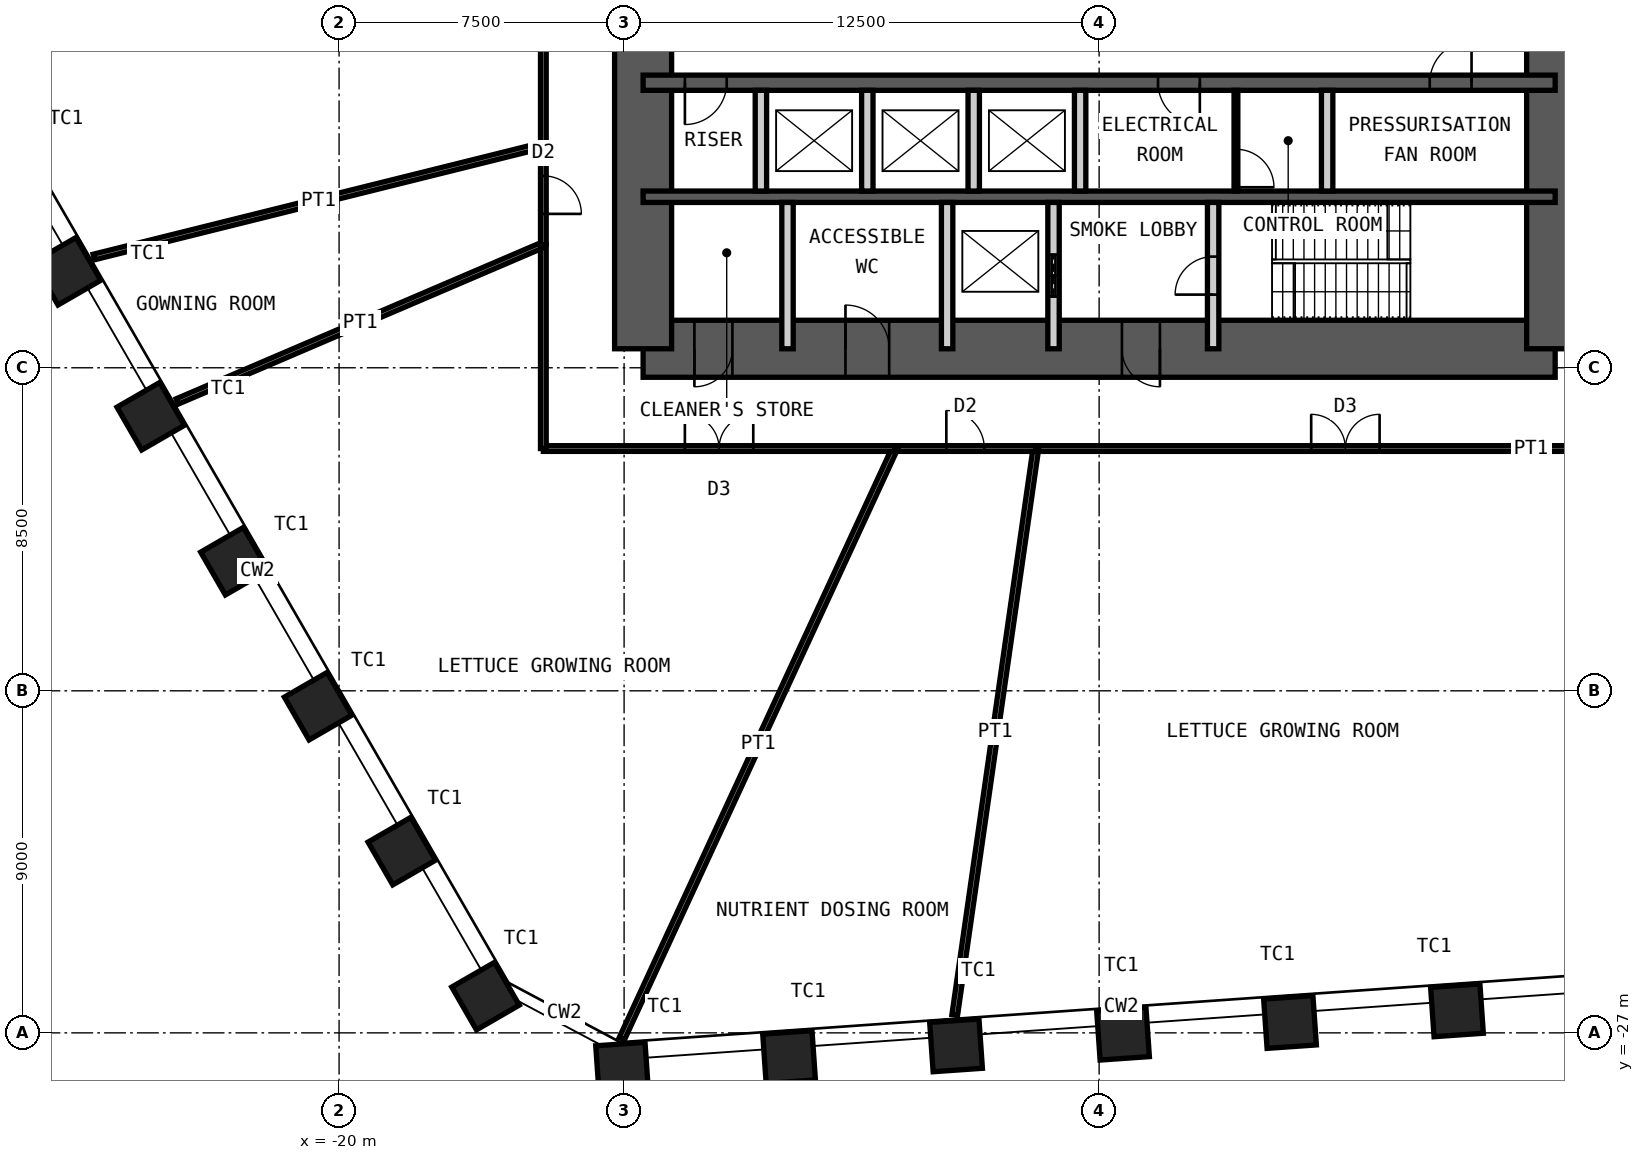
"""IFC4 building model, lengths in metres.
Left out: names, types, materials, properties, quantities, classifications, styles, units other than length and angle.
Written with IfcOpenShell. Run it as: python <this file> out.ifc"""

import sys

from ifc_helpers import new_model, si_unit, direction, frame, frame_2d, origin, origin_2d, place, context, subcontext, project, spatial, rectangle, hollow_rectangle, extrude, element, fill, save


model = new_model("IFC4")
c1 = context("Model", 3, precision=1e-05, world=origin(), true_north=direction((0.0, 1.0)))
c2 = subcontext(c1, "Body", "Model", "MODEL_VIEW")
j1 = project(units=[si_unit("LENGTHUNIT", "METRE"), si_unit("PLANEANGLEUNIT", "RADIAN")], contexts=[c1])
p1 = place(None, origin())
s1 = spatial("IfcSite", under=j1, at=p1, CompositionType="ELEMENT")
p2 = place(p1, origin())
s2 = spatial("IfcBuilding", under=s1, at=p2, CompositionType="ELEMENT")
p3 = place(p2, frame((0.0, 0.0, 47.0)))
s3 = spatial("IfcBuildingStorey", under=s2, at=p3, CompositionType="ELEMENT", Elevation=47.0)
for number, where, z_axis, x_axis in (
    (1, (9.417, -26.407, 0.0), (0.0, 0.0, 1.0), (0.998, 0.07, 0.0)),
    (2, (5.023, -26.715, 0.0), (0.0, 0.0, 1.0), (0.998, 0.07, 0.0)),
    (3, (0.629, -27.022, 0.0), (0.0, 0.0, 1.0), (0.998, 0.07, 0.0)),
    (4, (-3.765, -27.329, 0.0), (0.0, 0.0, 1.0), (0.998, 0.07, 0.0)),
    (5, (-8.159, -27.636, 0.0), (0.0, 0.0, 1.0), (0.998, 0.07, 0.0)),
    (6, (-12.553, -27.944, 0.0), (0.0, 0.0, 1.0), (0.998, 0.07, 0.0)),
    (7, (-16.147, -26.033, 0.0), (0.0, 0.0, 1.0), (0.5, -0.866, 0.0)),
    (8, (-18.349, -22.218, 0.0), (0.0, 0.0, 1.0), (0.5, -0.866, 0.0)),
    (9, (-20.552, -18.404, 0.0), (0.0, 0.0, 1.0), (0.5, -0.866, 0.0)),
    (10, (-22.754, -14.589, 0.0), (0.0, 0.0, 1.0), (0.5, -0.866, 0.0)),
    (11, (-24.956, -10.775, 0.0), (0.0, 0.0, 1.0), (0.5, -0.866, 0.0)),
    (12, (-27.158, -6.96, 0.0), (0.0, 0.0, 1.0), (0.5, -0.866, 0.0)),
):
    element("IfcColumn", number, at=place(p3, frame(where, z_axis=z_axis, x_axis=x_axis)), inside=s3, PredefinedType="COLUMN", context=c2, shape_type="SweptSolid", body=[
        extrude(hollow_rectangle(XDim=1.3, YDim=1.3, WallThickness=0.1, at=origin_2d()), origin(), (0.0, 0.0, 1.0), 5.0),
    ])
p4 = place(p3, frame((-12.0, -9.0, 0.0), z_axis=(0.0, 0.0, 1.0), x_axis=(1.0, 0.0, 0.0)))
e13 = element("IfcWall", 13, at=p4, inside=s3, PredefinedType="SHEAR", context=c2, shape_type="SweptSolid", body=[
    extrude(rectangle(XDim=24.0, YDim=1.5, at=frame_2d((12.0, 0.0))), origin(), (0.0, 0.0, 1.0), 5.0),
])
p5 = place(p4, frame((1.35, 0.0, 0.0)))
e14 = element("IfcOpeningElement", 14, at=p5, cuts=e13, PredefinedType="OPENING", context=c2, shape_type="SweptSolid", body=[
    extrude(rectangle(XDim=1.0, YDim=2.1, at=frame_2d((0.5, 1.05))), frame((0.0, 0.76, 0.0), z_axis=(0.0, -1.0, 0.0), x_axis=(1.0, 0.0, 0.0)), (0.0, 0.0, 1.0), 1.52),
])
p6 = place(p4, frame((5.325, 0.0, 0.0)))
e15 = element("IfcOpeningElement", 15, at=p6, cuts=e13, PredefinedType="OPENING", context=c2, shape_type="SweptSolid", body=[
    extrude(rectangle(XDim=1.15, YDim=2.1, at=frame_2d((0.575, 1.05))), frame((0.0, 0.76, 0.0), z_axis=(0.0, -1.0, 0.0), x_axis=(1.0, 0.0, 0.0)), (0.0, 0.0, 1.0), 1.52),
])
p7 = place(p4, frame((12.6, 0.0, 0.0)))
e16 = element("IfcOpeningElement", 16, at=p7, cuts=e13, PredefinedType="OPENING", context=c2, shape_type="SweptSolid", body=[
    extrude(rectangle(XDim=1.0, YDim=2.1, at=frame_2d((0.5, 1.05))), frame((0.0, 0.76, 0.0), z_axis=(0.0, -1.0, 0.0), x_axis=(1.0, 0.0, 0.0)), (0.0, 0.0, 1.0), 1.52),
])
p8 = place(p3, frame((12.0, -9.0, 0.0), z_axis=(0.0, 0.0, 1.0), x_axis=(0.0, 1.0, 0.0)))
e17 = element("IfcWall", 17, at=p8, inside=s3, PredefinedType="SHEAR", context=c2, shape_type="SweptSolid", body=[
    extrude(rectangle(XDim=18.0, YDim=1.5, at=frame_2d((9.0, 0.0))), origin(), (0.0, 0.0, 1.0), 5.0),
])
p9 = place(p8, frame((8.1, 0.0, 0.0)))
e18 = element("IfcOpeningElement", 18, at=p9, cuts=e17, PredefinedType="OPENING", context=c2, shape_type="SweptSolid", body=[
    extrude(rectangle(XDim=1.8, YDim=2.1, at=frame_2d((0.9, 1.05))), frame((0.0, 0.76, 0.0), z_axis=(0.0, -1.0, 0.0), x_axis=(1.0, 0.0, 0.0)), (0.0, 0.0, 1.0), 1.52),
])
p10 = place(p3, frame((-12.0, -9.0, 0.0), z_axis=(0.0, 0.0, 1.0), x_axis=(0.0, 1.0, 0.0)))
e19 = element("IfcWall", 19, at=p10, inside=s3, PredefinedType="SHEAR", context=c2, shape_type="SweptSolid", body=[
    extrude(rectangle(XDim=18.0, YDim=1.5, at=frame_2d((9.0, 0.0))), origin(), (0.0, 0.0, 1.0), 5.0),
])
p11 = place(p10, frame((8.1, 0.0, 0.0)))
e20 = element("IfcOpeningElement", 20, at=p11, cuts=e19, PredefinedType="OPENING", context=c2, shape_type="SweptSolid", body=[
    extrude(rectangle(XDim=1.8, YDim=2.1, at=frame_2d((0.9, 1.05))), frame((0.0, 0.76, 0.0), z_axis=(0.0, -1.0, 0.0), x_axis=(1.0, 0.0, 0.0)), (0.0, 0.0, 1.0), 1.52),
])
p12 = place(p3, frame((-12.0, -2.0, 0.0), z_axis=(0.0, 0.0, 1.0), x_axis=(1.0, 0.0, 0.0)))
e21 = element("IfcWall", 21, at=p12, inside=s3, PredefinedType="SHEAR", context=c2, shape_type="SweptSolid", body=[
    extrude(rectangle(XDim=24.0, YDim=0.4, at=frame_2d((12.0, 0.0))), origin(), (0.0, 0.0, 1.0), 5.0),
])
p13 = place(p12, frame((1.1, 0.0, 0.0)))
e22 = element("IfcOpeningElement", 22, at=p13, cuts=e21, PredefinedType="OPENING", context=c2, shape_type="SweptSolid", body=[
    extrude(rectangle(XDim=1.1, YDim=2.1, at=frame_2d((0.55, 1.05))), frame((0.0, 0.21, 0.0), z_axis=(0.0, -1.0, 0.0), x_axis=(1.0, 0.0, 0.0)), (0.0, 0.0, 1.0), 0.42),
])
p14 = place(p12, frame((13.55, 0.0, 0.0)))
e23 = element("IfcOpeningElement", 23, at=p14, cuts=e21, PredefinedType="OPENING", context=c2, shape_type="SweptSolid", body=[
    extrude(rectangle(XDim=1.1, YDim=2.1, at=frame_2d((0.55, 1.05))), frame((0.0, 0.21, 0.0), z_axis=(0.0, -1.0, 0.0), x_axis=(1.0, 0.0, 0.0)), (0.0, 0.0, 1.0), 0.42),
])
p15 = place(p12, frame((20.7, 0.0, 0.0)))
e24 = element("IfcOpeningElement", 24, at=p15, cuts=e21, PredefinedType="OPENING", context=c2, shape_type="SweptSolid", body=[
    extrude(rectangle(XDim=1.1, YDim=2.1, at=frame_2d((0.55, 1.05))), frame((0.0, 0.21, 0.0), z_axis=(0.0, -1.0, 0.0), x_axis=(1.0, 0.0, 0.0)), (0.0, 0.0, 1.0), 0.42),
])
p16 = place(p3, frame((-12.0, -5.0, 0.0), z_axis=(0.0, 0.0, 1.0), x_axis=(1.0, 0.0, 0.0)))
e25 = element("IfcWall", 25, at=p16, inside=s3, PredefinedType="SHEAR", context=c2, shape_type="SweptSolid", body=[
    extrude(rectangle(XDim=24.0, YDim=0.3, at=frame_2d((12.0, 0.0))), origin(), (0.0, 0.0, 1.0), 5.0),
])
for number, where, z_axis, x_axis in (
    (26, (-8.9, -4.85, 0.0), (0.0, 0.0, 1.0), (0.0, 1.0, 0.0)),
    (27, (-6.1, -4.85, 0.0), (0.0, 0.0, 1.0), (0.0, 1.0, 0.0)),
    (28, (-3.3, -4.85, 0.0), (0.0, 0.0, 1.0), (0.0, 1.0, 0.0)),
    (29, (-0.5, -4.85, 0.0), (0.0, 0.0, 1.0), (0.0, 1.0, 0.0)),
    (30, (6.0, -4.85, 0.0), (0.0, 0.0, 1.0), (0.0, 1.0, 0.0)),
):
    element("IfcWall", number, at=place(p3, frame(where, z_axis=z_axis, x_axis=x_axis)), inside=s3, PredefinedType="PARTITIONING", context=c2, shape_type="SweptSolid", body=[
        extrude(rectangle(XDim=2.65, YDim=0.3, at=frame_2d((1.325, 0.0))), origin(), (0.0, 0.0, 1.0), 4.78),
    ])
for number, where, z_axis, x_axis in (
    (31, (-8.2, -9.0, 0.0), (0.0, 0.0, 1.0), (0.0, 1.0, 0.0)),
    (32, (-4.0, -9.0, 0.0), (0.0, 0.0, 1.0), (0.0, 1.0, 0.0)),
):
    element("IfcWall", number, at=place(p3, frame(where, z_axis=z_axis, x_axis=x_axis)), inside=s3, PredefinedType="PARTITIONING", context=c2, shape_type="SweptSolid", body=[
        extrude(rectangle(XDim=3.85, YDim=0.3, at=frame_2d((1.925, 0.0))), origin(), (0.0, 0.0, 1.0), 4.78),
    ])
p17 = place(p3, frame((-1.2, -9.0, 0.0), z_axis=(0.0, 0.0, 1.0), x_axis=(0.0, 1.0, 0.0)))
e33 = element("IfcWall", 33, at=p17, inside=s3, PredefinedType="PARTITIONING", context=c2, shape_type="SweptSolid", body=[
    extrude(rectangle(XDim=3.85, YDim=0.3, at=frame_2d((1.925, 0.0))), origin(), (0.0, 0.0, 1.0), 4.78),
])
p18 = place(p17, frame((1.375, 0.0, 0.0)))
e34 = element("IfcOpeningElement", 34, at=p18, cuts=e33, PredefinedType="OPENING", context=c2, shape_type="SweptSolid", body=[
    extrude(rectangle(XDim=1.1, YDim=2.4, at=frame_2d((0.55, 1.2))), frame((0.0, 0.16, 0.0), z_axis=(0.0, -1.0, 0.0), x_axis=(1.0, 0.0, 0.0)), (0.0, 0.0, 1.0), 0.32),
])
p19 = place(p3, frame((3.0, -9.0, 0.0), z_axis=(0.0, 0.0, 1.0), x_axis=(0.0, 1.0, 0.0)))
e35 = element("IfcWall", 35, at=p19, inside=s3, PredefinedType="PARTITIONING", context=c2, shape_type="SweptSolid", body=[
    extrude(rectangle(XDim=3.85, YDim=0.3, at=frame_2d((1.925, 0.0))), origin(), (0.0, 0.0, 1.0), 4.78),
])
p20 = place(p19, frame((1.425, 0.0, 0.0)))
e36 = element("IfcOpeningElement", 36, at=p20, cuts=e35, PredefinedType="OPENING", context=c2, shape_type="SweptSolid", body=[
    extrude(rectangle(XDim=1.0, YDim=2.1, at=frame_2d((0.5, 1.05))), frame((0.0, 0.16, 0.0), z_axis=(0.0, -1.0, 0.0), x_axis=(1.0, 0.0, 0.0)), (0.0, 0.0, 1.0), 0.32),
])
p21 = place(p3, frame((3.6, -4.85, 0.0), z_axis=(0.0, 0.0, 1.0), x_axis=(0.0, 1.0, 0.0)))
e37 = element("IfcWall", 37, at=p21, inside=s3, PredefinedType="PARTITIONING", context=c2, shape_type="SweptSolid", body=[
    extrude(rectangle(XDim=2.65, YDim=0.1, at=frame_2d((1.325, 0.0))), origin(), (0.0, 0.0, 1.0), 4.78),
])
p22 = place(p21, frame((0.1, 0.0, 0.0)))
e38 = element("IfcOpeningElement", 38, at=p22, cuts=e37, PredefinedType="OPENING", context=c2, shape_type="SweptSolid", body=[
    extrude(rectangle(XDim=1.0, YDim=2.4, at=frame_2d((0.5, 1.2))), frame((0.0, 0.06, 0.0), z_axis=(0.0, -1.0, 0.0), x_axis=(1.0, 0.0, 0.0)), (0.0, 0.0, 1.0), 0.12),
])
p23 = place(p3, frame((14.625, -11.625, 0.0), z_axis=(0.0, 0.0, 1.0), x_axis=(-1.0, 0.0, 0.0)))
e39 = element("IfcWall", 39, at=p23, inside=s3, PredefinedType="PARTITIONING", context=c2, shape_type="SweptSolid", body=[
    extrude(rectangle(XDim=16.29, YDim=0.15, at=frame_2d((8.145, 0.0))), origin(), (0.0, 0.0, 1.0), 4.8),
])
p24 = place(p23, frame((7.245, 0.0, 0.0)))
e40 = element("IfcOpeningElement", 40, at=p24, cuts=e39, PredefinedType="OPENING", context=c2, shape_type="SweptSolid", body=[
    extrude(rectangle(XDim=1.8, YDim=2.4, at=frame_2d((0.9, 1.2))), frame((0.0, 0.085, 0.0), z_axis=(0.0, -1.0, 0.0), x_axis=(1.0, 0.0, 0.0)), (0.0, 0.0, 1.0), 0.17),
])
p25 = place(p3, frame((-3.8, -26.532, 0.0), z_axis=(0.0, 0.0, 1.0), x_axis=(0.14177542097, 0.989898848372, 0.0)))
e41 = element("IfcWall", 41, at=p25, inside=s3, PredefinedType="PARTITIONING", context=c2, shape_type="SweptSolid", body=[
    extrude(rectangle(XDim=15.059, YDim=0.15, at=frame_2d((7.53, 0.0))), origin(), (0.0, 0.0, 1.0), 3.7),
])
p26 = place(p3, frame((-1.665, -11.625, 0.0), z_axis=(0.0, 0.0, 1.0), x_axis=(-1.0, 0.0, 0.0)))
e42 = element("IfcWall", 42, at=p26, inside=s3, PredefinedType="PARTITIONING", context=c2, shape_type="SweptSolid", body=[
    extrude(rectangle(XDim=3.712, YDim=0.15, at=frame_2d((1.856, 0.0))), origin(), (0.0, 0.0, 1.0), 4.8),
])
p27 = place(p26, frame((1.356, 0.0, 0.0)))
e43 = element("IfcOpeningElement", 43, at=p27, cuts=e42, PredefinedType="OPENING", context=c2, shape_type="SweptSolid", body=[
    extrude(rectangle(XDim=1.0, YDim=2.4, at=frame_2d((0.5, 1.2))), frame((0.0, 0.085, 0.0), z_axis=(0.0, -1.0, 0.0), x_axis=(1.0, 0.0, 0.0)), (0.0, 0.0, 1.0), 0.17),
])
p28 = place(p3, frame((-12.56, -27.155, 0.0), z_axis=(0.0, 0.0, 1.0), x_axis=(0.419799104875, 0.907617051154, 0.0)))
e44 = element("IfcWall", 44, at=p28, inside=s3, PredefinedType="PARTITIONING", context=c2, shape_type="SweptSolid", body=[
    extrude(rectangle(XDim=17.11, YDim=0.15, at=frame_2d((8.555, 0.0))), origin(), (0.0, 0.0, 1.0), 3.7),
])
p29 = place(p3, frame((-5.377, -11.625, 0.0), z_axis=(0.0, 0.0, 1.0), x_axis=(-1.0, 0.0, 0.0)))
e45 = element("IfcWall", 45, at=p29, inside=s3, PredefinedType="PARTITIONING", context=c2, shape_type="SweptSolid", body=[
    extrude(rectangle(XDim=9.248, YDim=0.15, at=frame_2d((4.624, 0.0))), origin(), (0.0, 0.0, 1.0), 4.8),
])
p30 = place(p29, frame((3.724, 0.0, 0.0)))
e46 = element("IfcOpeningElement", 46, at=p30, cuts=e45, PredefinedType="OPENING", context=c2, shape_type="SweptSolid", body=[
    extrude(rectangle(XDim=1.8, YDim=2.4, at=frame_2d((0.9, 1.2))), frame((0.0, 0.085, 0.0), z_axis=(0.0, -1.0, 0.0), x_axis=(1.0, 0.0, 0.0)), (0.0, 0.0, 1.0), 0.17),
])
p31 = place(p3, frame((-14.625, -11.625, 0.0), z_axis=(0.0, 0.0, 1.0), x_axis=(0.0, 1.0, 0.0)))
e47 = element("IfcWall", 47, at=p31, inside=s3, PredefinedType="PARTITIONING", context=c2, shape_type="SweptSolid", body=[
    extrude(rectangle(XDim=5.364, YDim=0.15, at=frame_2d((2.682, 0.0))), origin(), (0.0, 0.0, 1.0), 4.8),
])
p32 = place(p3, frame((-24.258, -10.385, 0.0), z_axis=(0.0, 0.0, 1.0), x_axis=(0.919298009201, 0.393562155547, 0.0)))
e48 = element("IfcWall", 48, at=p32, inside=s3, PredefinedType="PARTITIONING", context=c2, shape_type="SweptSolid", body=[
    extrude(rectangle(XDim=10.479, YDim=0.15, at=frame_2d((5.239, 0.0))), origin(), (0.0, 0.0, 1.0), 3.7),
])
p33 = place(p3, frame((-14.625, -6.261, 0.0), z_axis=(0.0, 0.0, 1.0), x_axis=(0.0, 1.0, 0.0)))
e49 = element("IfcWall", 49, at=p33, inside=s3, PredefinedType="PARTITIONING", context=c2, shape_type="SweptSolid", body=[
    extrude(rectangle(XDim=2.62, YDim=0.15, at=frame_2d((1.31, 0.0))), origin(), (0.0, 0.0, 1.0), 4.8),
])
p34 = place(p33, frame((0.81, 0.0, 0.0)))
e50 = element("IfcOpeningElement", 50, at=p34, cuts=e49, PredefinedType="OPENING", context=c2, shape_type="SweptSolid", body=[
    extrude(rectangle(XDim=1.0, YDim=2.4, at=frame_2d((0.5, 1.2))), frame((0.0, 0.085, 0.0), z_axis=(0.0, -1.0, 0.0), x_axis=(1.0, 0.0, 0.0)), (0.0, 0.0, 1.0), 0.17),
])
p35 = place(p3, frame((-26.455, -6.586, 0.0), z_axis=(0.0, 0.0, 1.0), x_axis=(0.970383505188, 0.241569561118, 0.0)))
e51 = element("IfcWall", 51, at=p35, inside=s3, PredefinedType="PARTITIONING", context=c2, shape_type="SweptSolid", body=[
    extrude(rectangle(XDim=12.191, YDim=0.15, at=frame_2d((6.096, 0.0))), origin(), (0.0, 0.0, 1.0), 3.7),
])
p36 = place(p3, frame((-14.625, -3.641, 0.0), z_axis=(0.0, 0.0, 1.0), x_axis=(0.0, 1.0, 0.0)))
e52 = element("IfcWall", 52, at=p36, inside=s3, PredefinedType="PARTITIONING", context=c2, shape_type="SweptSolid", body=[
    extrude(rectangle(XDim=6.214, YDim=0.15, at=frame_2d((3.107, 0.0))), origin(), (0.0, 0.0, 1.0), 4.8),
])
p37 = place(p36, frame((2.607, 0.0, 0.0)))
e53 = element("IfcOpeningElement", 53, at=p37, cuts=e52, PredefinedType="OPENING", context=c2, shape_type="SweptSolid", body=[
    extrude(rectangle(XDim=1.0, YDim=2.4, at=frame_2d((0.5, 1.2))), frame((0.0, 0.085, 0.0), z_axis=(0.0, -1.0, 0.0), x_axis=(1.0, 0.0, 0.0)), (0.0, 0.0, 1.0), 0.17),
])
p38 = place(p5, origin())
e54 = element("IfcDoor", 54, at=p38, inside=s3, OperationType="SINGLE_SWING_LEFT", PredefinedType="DOOR", context=c2, shape_type="SweptSolid", body=[
    extrude(rectangle(XDim=1.0, YDim=2.1, at=frame_2d((0.5, 1.05))), frame((0.0, 0.025, 0.0), z_axis=(0.0, -1.0, 0.0), x_axis=(1.0, 0.0, 0.0)), (0.0, 0.0, 1.0), 0.05),
])
fill(e14, e54)
p39 = place(p6, origin())
e55 = element("IfcDoor", 55, at=p39, inside=s3, OperationType="SINGLE_SWING_RIGHT", PredefinedType="DOOR", context=c2, shape_type="SweptSolid", body=[
    extrude(rectangle(XDim=1.15, YDim=2.1, at=frame_2d((0.575, 1.05))), frame((0.0, 0.025, 0.0), z_axis=(0.0, -1.0, 0.0), x_axis=(1.0, 0.0, 0.0)), (0.0, 0.0, 1.0), 0.05),
])
fill(e15, e55)
p40 = place(p7, origin())
e56 = element("IfcDoor", 56, at=p40, inside=s3, OperationType="SINGLE_SWING_RIGHT", PredefinedType="DOOR", context=c2, shape_type="SweptSolid", body=[
    extrude(rectangle(XDim=1.0, YDim=2.1, at=frame_2d((0.5, 1.05))), frame((0.0, 0.025, 0.0), z_axis=(0.0, -1.0, 0.0), x_axis=(1.0, 0.0, 0.0)), (0.0, 0.0, 1.0), 0.05),
])
fill(e16, e56)
p41 = place(p20, origin())
e57 = element("IfcDoor", 57, at=p41, inside=s3, OperationType="SINGLE_SWING_RIGHT", PredefinedType="DOOR", context=c2, shape_type="SweptSolid", body=[
    extrude(rectangle(XDim=1.0, YDim=2.1, at=frame_2d((0.5, 1.05))), frame((0.0, 0.025, 0.0), z_axis=(0.0, -1.0, 0.0), x_axis=(1.0, 0.0, 0.0)), (0.0, 0.0, 1.0), 0.05),
])
fill(e36, e57)
p42 = place(p13, origin())
e58 = element("IfcDoor", 58, at=p42, inside=s3, OperationType="SINGLE_SWING_LEFT", PredefinedType="DOOR", context=c2, shape_type="SweptSolid", body=[
    extrude(rectangle(XDim=1.1, YDim=2.1, at=frame_2d((0.55, 1.05))), frame((0.0, 0.025, 0.0), z_axis=(0.0, -1.0, 0.0), x_axis=(1.0, 0.0, 0.0)), (0.0, 0.0, 1.0), 0.05),
])
fill(e22, e58)
p43 = place(p14, origin())
e59 = element("IfcDoor", 59, at=p43, inside=s3, OperationType="SINGLE_SWING_RIGHT", PredefinedType="DOOR", context=c2, shape_type="SweptSolid", body=[
    extrude(rectangle(XDim=1.1, YDim=2.1, at=frame_2d((0.55, 1.05))), frame((0.0, 0.025, 0.0), z_axis=(0.0, -1.0, 0.0), x_axis=(1.0, 0.0, 0.0)), (0.0, 0.0, 1.0), 0.05),
])
fill(e23, e59)
p44 = place(p15, origin())
e60 = element("IfcDoor", 60, at=p44, inside=s3, OperationType="SINGLE_SWING_LEFT", PredefinedType="DOOR", context=c2, shape_type="SweptSolid", body=[
    extrude(rectangle(XDim=1.1, YDim=2.1, at=frame_2d((0.55, 1.05))), frame((0.0, 0.025, 0.0), z_axis=(0.0, -1.0, 0.0), x_axis=(1.0, 0.0, 0.0)), (0.0, 0.0, 1.0), 0.05),
])
fill(e24, e60)
p45 = place(p18, origin())
e61 = element("IfcDoor", 61, at=p45, inside=s3, OperationType="DOUBLE_DOOR_SLIDING", PredefinedType="DOOR", context=c2, shape_type="SweptSolid", body=[
    extrude(rectangle(XDim=1.1, YDim=2.4, at=frame_2d((0.55, 1.2))), frame((0.0, 0.025, 0.0), z_axis=(0.0, -1.0, 0.0), x_axis=(1.0, 0.0, 0.0)), (0.0, 0.0, 1.0), 0.05),
])
fill(e34, e61)
p46 = place(p22, origin())
e62 = element("IfcDoor", 62, at=p46, inside=s3, OperationType="SINGLE_SWING_LEFT", PredefinedType="DOOR", context=c2, shape_type="SweptSolid", body=[
    extrude(rectangle(XDim=1.0, YDim=2.4, at=frame_2d((0.5, 1.2))), frame((0.0, 0.025, 0.0), z_axis=(0.0, -1.0, 0.0), x_axis=(1.0, 0.0, 0.0)), (0.0, 0.0, 1.0), 0.05),
])
fill(e38, e62)
p47 = place(p24, origin())
e63 = element("IfcDoor", 63, at=p47, inside=s3, OperationType="DOUBLE_DOOR_DOUBLE_SWING", PredefinedType="DOOR", context=c2, shape_type="SweptSolid", body=[
    extrude(rectangle(XDim=1.8, YDim=2.4, at=frame_2d((0.9, 1.2))), frame((0.0, 0.025, 0.0), z_axis=(0.0, -1.0, 0.0), x_axis=(1.0, 0.0, 0.0)), (0.0, 0.0, 1.0), 0.05),
])
fill(e40, e63)
p48 = place(p27, origin())
e64 = element("IfcDoor", 64, at=p48, inside=s3, OperationType="SINGLE_SWING_RIGHT", PredefinedType="DOOR", context=c2, shape_type="SweptSolid", body=[
    extrude(rectangle(XDim=1.0, YDim=2.4, at=frame_2d((0.5, 1.2))), frame((0.0, 0.025, 0.0), z_axis=(0.0, -1.0, 0.0), x_axis=(1.0, 0.0, 0.0)), (0.0, 0.0, 1.0), 0.05),
])
fill(e43, e64)
p49 = place(p30, origin())
e65 = element("IfcDoor", 65, at=p49, inside=s3, OperationType="DOUBLE_DOOR_DOUBLE_SWING", PredefinedType="DOOR", context=c2, shape_type="SweptSolid", body=[
    extrude(rectangle(XDim=1.8, YDim=2.4, at=frame_2d((0.9, 1.2))), frame((0.0, 0.025, 0.0), z_axis=(0.0, -1.0, 0.0), x_axis=(1.0, 0.0, 0.0)), (0.0, 0.0, 1.0), 0.05),
])
fill(e46, e65)
p50 = place(p34, origin())
e66 = element("IfcDoor", 66, at=p50, inside=s3, OperationType="SINGLE_SWING_LEFT", PredefinedType="DOOR", context=c2, shape_type="SweptSolid", body=[
    extrude(rectangle(XDim=1.0, YDim=2.4, at=frame_2d((0.5, 1.2))), frame((0.0, 0.025, 0.0), z_axis=(0.0, -1.0, 0.0), x_axis=(1.0, 0.0, 0.0)), (0.0, 0.0, 1.0), 0.05),
])
fill(e50, e66)
save(model, sys.argv[1])
